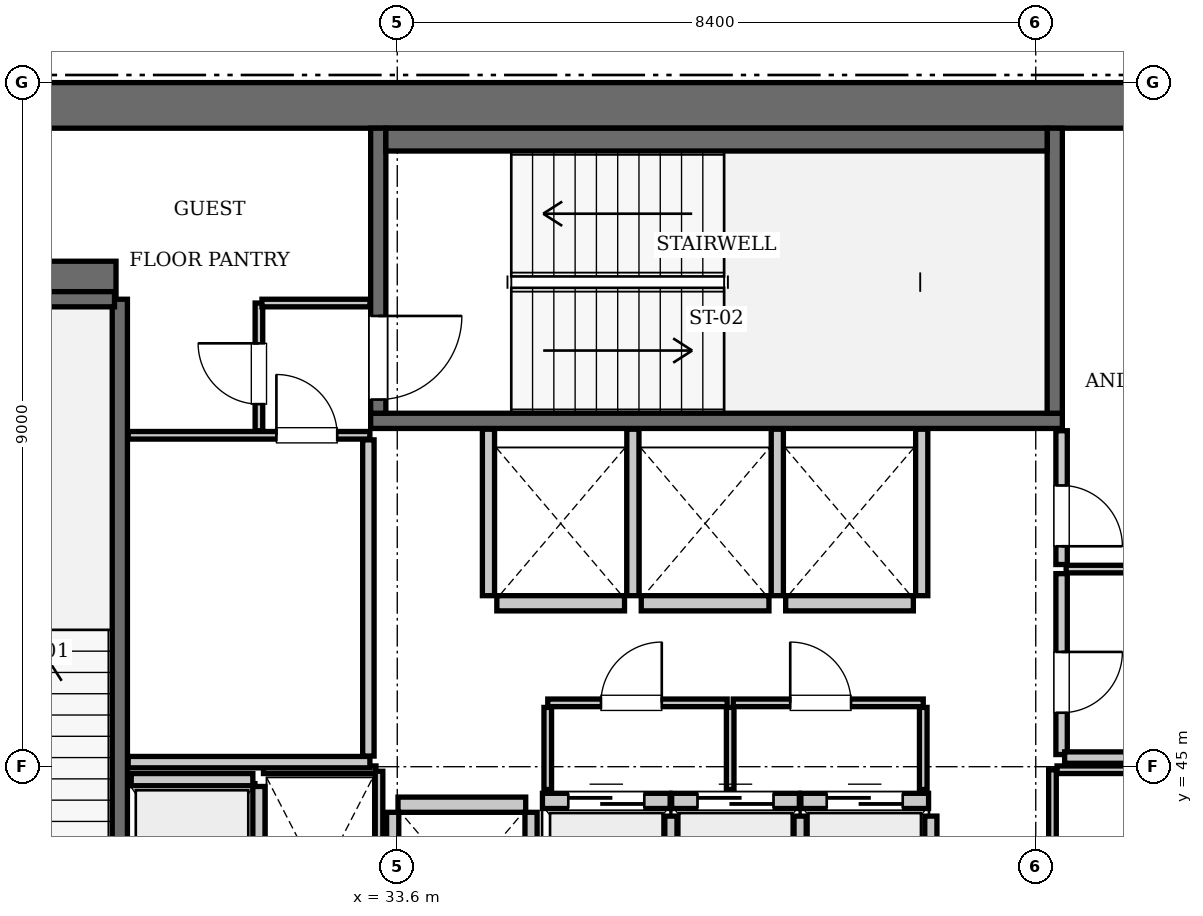
"""IFC4 building model, lengths in metres.
Left out: names, types, materials, properties, quantities, classifications, styles, units other than length and angle.
Written with IfcOpenShell. Run it as: python <this file> out.ifc"""

import sys

from ifc_helpers import new_model, si_unit, direction, frame, frame_2d, origin, place, context, subcontext, project, spatial, rectangle, extrude, element, fill, save


model = new_model("IFC4")
c1 = context("Model", 3, precision=1e-05, world=origin(), true_north=direction((0.0, 1.0)))
c2 = subcontext(c1, "Body", "Model", "MODEL_VIEW")
j1 = project(units=[si_unit("LENGTHUNIT", "METRE"), si_unit("PLANEANGLEUNIT", "RADIAN")], contexts=[c1])
p1 = place(None, origin())
s1 = spatial("IfcSite", under=j1, at=p1, CompositionType="ELEMENT")
p2 = place(p1, origin())
s2 = spatial("IfcBuilding", under=s1, at=p2, CompositionType="ELEMENT")
p3 = place(p2, frame((0.0, 0.0, 301.0)))
s3 = spatial("IfcBuildingStorey", under=s2, at=p3, CompositionType="ELEMENT", Elevation=301.0)
p4 = place(p3, frame((25.2, 53.7, 0.0), z_axis=(0.0, 0.0, 1.0), x_axis=(1.0, 0.0, 0.0)))
e1 = element("IfcWall", 1, at=p4, inside=s3, PredefinedType="SHEAR", context=c2, shape_type="SweptSolid", body=[
    extrude(rectangle(XDim=25.2, YDim=0.6, at=frame_2d((12.6, 0.0))), origin(), (0.0, 0.0, 1.0), 3.85),
])
p5 = place(p3, frame((25.8, 51.4, 0.0), z_axis=(0.0, 0.0, 1.0), x_axis=(1.0, 0.0, 0.0)))
e2 = element("IfcWall", 2, at=p5, inside=s3, PredefinedType="SHEAR", context=c2, shape_type="SweptSolid", body=[
    extrude(rectangle(XDim=4.1, YDim=0.5, at=frame_2d((2.05, 0.0))), origin(), (0.0, 0.0, 1.0), 3.85),
])
p6 = place(p3, frame((29.95, 42.0, 0.0), z_axis=(0.0, 0.0, 1.0), x_axis=(0.0, 1.0, 0.0)))
e3 = element("IfcWall", 3, at=p6, inside=s3, PredefinedType="SOLIDWALL", context=c2, shape_type="SweptSolid", body=[
    extrude(rectangle(XDim=9.15, YDim=0.2, at=frame_2d((4.575, 0.0))), origin(), (0.0, 0.0, 1.0), 3.61),
])
p7 = place(p3, frame((26.38, 51.15, 0.0), z_axis=(0.0, 0.0, 1.0), x_axis=(1.0, 0.0, 0.0)))
e4 = element("IfcWall", 4, at=p7, inside=s3, PredefinedType="SOLIDWALL", context=c2, shape_type="SweptSolid", body=[
    extrude(rectangle(XDim=3.5, YDim=0.2, at=frame_2d((1.75, 0.0))), origin(), (0.0, 0.0, 1.0), 3.61),
])
p8 = place(p3, frame((33.25, 49.55, 0.0), z_axis=(0.0, 0.0, 1.0), x_axis=(1.0, 0.0, 0.0)))
e5 = element("IfcWall", 5, at=p8, inside=s3, PredefinedType="SOLIDWALL", context=c2, shape_type="SweptSolid", body=[
    extrude(rectangle(XDim=9.1, YDim=0.2, at=frame_2d((4.55, 0.0))), origin(), (0.0, 0.0, 1.0), 3.61),
])
p9 = place(p3, frame((42.25, 49.65, 0.0), z_axis=(0.0, 0.0, 1.0), x_axis=(0.0, 1.0, 0.0)))
e6 = element("IfcWall", 6, at=p9, inside=s3, PredefinedType="SOLIDWALL", context=c2, shape_type="SweptSolid", body=[
    extrude(rectangle(XDim=3.75, YDim=0.2, at=frame_2d((1.875, 0.0))), origin(), (0.0, 0.0, 1.0), 3.61),
])
p10 = place(p3, frame((33.35, 49.65, 0.0), z_axis=(0.0, 0.0, 1.0), x_axis=(0.0, 1.0, 0.0)))
e7 = element("IfcWall", 7, at=p10, inside=s3, PredefinedType="SOLIDWALL", context=c2, shape_type="SweptSolid", body=[
    extrude(rectangle(XDim=3.75, YDim=0.2, at=frame_2d((1.875, 0.0))), origin(), (0.0, 0.0, 1.0), 3.61),
])
p11 = place(p10, frame((0.18, 0.0, 0.0)))
e8 = element("IfcOpeningElement", 8, at=p11, cuts=e7, PredefinedType="OPENING", context=c2, shape_type="SweptSolid", body=[
    extrude(rectangle(XDim=1.1, YDim=2.15, at=frame_2d((0.55, 1.075))), frame((0.0, 0.11, 0.0), z_axis=(0.0, -1.0, 0.0), x_axis=(1.0, 0.0, 0.0)), (0.0, 0.0, 1.0), 0.22),
])
p12 = place(p3, frame((33.45, 53.25, 0.0), z_axis=(0.0, 0.0, 1.0), x_axis=(1.0, 0.0, 0.0)))
e9 = element("IfcWall", 9, at=p12, inside=s3, PredefinedType="SOLIDWALL", context=c2, shape_type="SweptSolid", body=[
    extrude(rectangle(XDim=8.7, YDim=0.3, at=frame_2d((4.35, 0.0))), origin(), (0.0, 0.0, 1.0), 3.61),
])
p13 = place(p3, frame((35.51, 44.55, 0.0), z_axis=(0.0, 0.0, 1.0), x_axis=(1.0, 0.0, 0.0)))
e10 = element("IfcWall", 10, at=p13, inside=s3, PredefinedType="SOLIDWALL", context=c2, shape_type="SweptSolid", body=[
    extrude(rectangle(XDim=1.68, YDim=0.2, at=frame_2d((0.84, 0.0))), origin(), (0.0, 0.0, 1.0), 3.61),
])
p14 = place(p13, frame((0.34, 0.0, 0.0)))
e11 = element("IfcOpeningElement", 11, at=p14, cuts=e10, PredefinedType="OPENING", context=c2, shape_type="SweptSolid", body=[
    extrude(rectangle(XDim=1.0, YDim=2.15, at=frame_2d((0.5, 1.075))), frame((0.0, 0.11, 0.0), z_axis=(0.0, -1.0, 0.0), x_axis=(1.0, 0.0, 0.0)), (0.0, 0.0, 1.0), 0.22),
])
p15 = place(p3, frame((37.21, 44.55, 0.0), z_axis=(0.0, 0.0, 1.0), x_axis=(1.0, 0.0, 0.0)))
e12 = element("IfcWall", 12, at=p15, inside=s3, PredefinedType="SOLIDWALL", context=c2, shape_type="SweptSolid", body=[
    extrude(rectangle(XDim=1.68, YDim=0.2, at=frame_2d((0.84, 0.0))), origin(), (0.0, 0.0, 1.0), 3.61),
])
p16 = place(p15, frame((0.34, 0.0, 0.0)))
e13 = element("IfcOpeningElement", 13, at=p16, cuts=e12, PredefinedType="OPENING", context=c2, shape_type="SweptSolid", body=[
    extrude(rectangle(XDim=1.0, YDim=2.15, at=frame_2d((0.5, 1.075))), frame((0.0, 0.11, 0.0), z_axis=(0.0, -1.0, 0.0), x_axis=(1.0, 0.0, 0.0)), (0.0, 0.0, 1.0), 0.22),
])
p17 = place(p3, frame((38.91, 44.55, 0.0), z_axis=(0.0, 0.0, 1.0), x_axis=(1.0, 0.0, 0.0)))
e14 = element("IfcWall", 14, at=p17, inside=s3, PredefinedType="SOLIDWALL", context=c2, shape_type="SweptSolid", body=[
    extrude(rectangle(XDim=1.68, YDim=0.2, at=frame_2d((0.84, 0.0))), origin(), (0.0, 0.0, 1.0), 3.61),
])
p18 = place(p17, frame((0.34, 0.0, 0.0)))
e15 = element("IfcOpeningElement", 15, at=p18, cuts=e14, PredefinedType="OPENING", context=c2, shape_type="SweptSolid", body=[
    extrude(rectangle(XDim=1.0, YDim=2.15, at=frame_2d((0.5, 1.075))), frame((0.0, 0.11, 0.0), z_axis=(0.0, -1.0, 0.0), x_axis=(1.0, 0.0, 0.0)), (0.0, 0.0, 1.0), 0.22),
])
p19 = place(p3, frame((34.91, 47.15, 0.0), z_axis=(0.0, 0.0, 1.0), x_axis=(1.0, 0.0, 0.0)))
e16 = element("IfcWall", 16, at=p19, inside=s3, PredefinedType="SOLIDWALL", context=c2, shape_type="SweptSolid", body=[
    extrude(rectangle(XDim=1.68, YDim=0.2, at=frame_2d((0.84, 0.0))), origin(), (0.0, 0.0, 1.0), 3.61),
])
for number, where, z_axis, x_axis in (
    (17, (36.81, 47.15, 0.0), (0.0, 0.0, 1.0), (1.0, 0.0, 0.0)),
    (18, (38.71, 47.15, 0.0), (0.0, 0.0, 1.0), (1.0, 0.0, 0.0)),
    (19, (33.61, 44.5, 0.0), (0.0, 0.0, 1.0), (1.0, 0.0, 0.0)),
):
    element("IfcWall", number, at=place(p3, frame(where, z_axis=z_axis, x_axis=x_axis)), inside=s3, PredefinedType="SOLIDWALL", context=c2, shape_type="SweptSolid", body=[
        extrude(rectangle(XDim=1.68, YDim=0.2, at=frame_2d((0.84, 0.0))), origin(), (0.0, 0.0, 1.0), 3.61),
    ])
p20 = place(p3, frame((30.1, 44.83, 0.0), z_axis=(0.0, 0.0, 1.0), x_axis=(1.0, 0.0, 0.0)))
e20 = element("IfcWall", 20, at=p20, inside=s3, PredefinedType="SOLIDWALL", context=c2, shape_type="SweptSolid", body=[
    extrude(rectangle(XDim=1.6, YDim=0.16, at=frame_2d((0.8, 0.0))), origin(), (0.0, 0.0, 1.0), 3.61),
])
p21 = place(p3, frame((31.78, 42.0, 0.0), z_axis=(0.0, 0.0, 1.0), x_axis=(0.0, 1.0, 0.0)))
e21 = element("IfcWall", 21, at=p21, inside=s3, PredefinedType="SOLIDWALL", context=c2, shape_type="SweptSolid", body=[
    extrude(rectangle(XDim=2.74, YDim=0.16, at=frame_2d((1.37, 0.0))), origin(), (0.0, 0.0, 1.0), 3.61),
])
for number, where, z_axis, x_axis in (
    (22, (37.2, 42.0, 0.0), (0.0, 0.0, 1.0), (0.0, 1.0, 0.0)),
    (23, (38.9, 42.0, 0.0), (0.0, 0.0, 1.0), (0.0, 1.0, 0.0)),
    (24, (40.62, 42.0, 0.0), (0.0, 0.0, 1.0), (0.0, 1.0, 0.0)),
):
    element("IfcWall", number, at=place(p3, frame(where, z_axis=z_axis, x_axis=x_axis)), inside=s3, PredefinedType="SOLIDWALL", context=c2, shape_type="SweptSolid", body=[
        extrude(rectangle(XDim=2.35, YDim=0.16, at=frame_2d((1.175, 0.0))), origin(), (0.0, 0.0, 1.0), 3.61),
    ])
for number, where, z_axis, x_axis in (
    (25, (34.8, 47.25, 0.0), (0.0, 0.0, 1.0), (0.0, 1.0, 0.0)),
    (26, (36.7, 47.25, 0.0), (0.0, 0.0, 1.0), (0.0, 1.0, 0.0)),
    (27, (38.6, 47.25, 0.0), (0.0, 0.0, 1.0), (0.0, 1.0, 0.0)),
    (28, (40.5, 47.25, 0.0), (0.0, 0.0, 1.0), (0.0, 1.0, 0.0)),
):
    element("IfcWall", number, at=place(p3, frame(where, z_axis=z_axis, x_axis=x_axis)), inside=s3, PredefinedType="SOLIDWALL", context=c2, shape_type="SweptSolid", body=[
        extrude(rectangle(XDim=2.19, YDim=0.16, at=frame_2d((1.095, 0.0))), origin(), (0.0, 0.0, 1.0), 3.61),
    ])
for number, where, z_axis, x_axis in (
    (29, (33.54, 42.0, 0.0), (0.0, 0.0, 1.0), (0.0, 1.0, 0.0)),
    (30, (35.36, 42.0, 0.0), (0.0, 0.0, 1.0), (0.0, 1.0, 0.0)),
):
    element("IfcWall", number, at=place(p3, frame(where, z_axis=z_axis, x_axis=x_axis)), inside=s3, PredefinedType="SOLIDWALL", context=c2, shape_type="SweptSolid", body=[
        extrude(rectangle(XDim=2.4, YDim=0.16, at=frame_2d((1.2, 0.0))), origin(), (0.0, 0.0, 1.0), 3.61),
    ])
p22 = place(p3, frame((31.84, 44.96, 0.0), z_axis=(0.0, 0.0, 1.0), x_axis=(1.0, 0.0, 0.0)))
e31 = element("IfcWall", 31, at=p22, inside=s3, PredefinedType="PARTITIONING", context=c2, shape_type="SweptSolid", body=[
    extrude(rectangle(XDim=1.48, YDim=0.1, at=frame_2d((0.74, 0.0))), origin(), (0.0, 0.0, 1.0), 3.61),
])
p23 = place(p3, frame((33.36, 42.06, 0.0), z_axis=(0.0, 0.0, 1.0), x_axis=(0.0, 1.0, 0.0)))
e32 = element("IfcWall", 32, at=p23, inside=s3, PredefinedType="PARTITIONING", context=c2, shape_type="SweptSolid", body=[
    extrude(rectangle(XDim=2.88, YDim=0.1, at=frame_2d((1.44, 0.0))), origin(), (0.0, 0.0, 1.0), 3.61),
])
p24 = place(p3, frame((35.58, 45.84, 0.0), z_axis=(0.0, 0.0, 1.0), x_axis=(1.0, 0.0, 0.0)))
e33 = element("IfcWall", 33, at=p24, inside=s3, PredefinedType="PARTITIONING", context=c2, shape_type="SweptSolid", body=[
    extrude(rectangle(XDim=2.36, YDim=0.1, at=frame_2d((1.18, 0.0))), origin(), (0.0, 0.0, 1.0), 3.61),
])
p25 = place(p24, frame((0.7, 0.0, 0.0)))
e34 = element("IfcOpeningElement", 34, at=p25, cuts=e33, PredefinedType="OPENING", context=c2, shape_type="SweptSolid", body=[
    extrude(rectangle(XDim=0.8, YDim=2.05, at=frame_2d((0.4, 1.025))), frame((0.0, 0.06, 0.0), z_axis=(0.0, -1.0, 0.0), x_axis=(1.0, 0.0, 0.0)), (0.0, 0.0, 1.0), 0.12),
])
p26 = place(p3, frame((38.02, 45.84, 0.0), z_axis=(0.0, 0.0, 1.0), x_axis=(1.0, 0.0, 0.0)))
e35 = element("IfcWall", 35, at=p26, inside=s3, PredefinedType="PARTITIONING", context=c2, shape_type="SweptSolid", body=[
    extrude(rectangle(XDim=2.5, YDim=0.1, at=frame_2d((1.25, 0.0))), origin(), (0.0, 0.0, 1.0), 3.61),
])
p27 = place(p26, frame((0.75, 0.0, 0.0)))
e36 = element("IfcOpeningElement", 36, at=p27, cuts=e35, PredefinedType="OPENING", context=c2, shape_type="SweptSolid", body=[
    extrude(rectangle(XDim=0.8, YDim=2.05, at=frame_2d((0.4, 1.025))), frame((0.0, 0.06, 0.0), z_axis=(0.0, -1.0, 0.0), x_axis=(1.0, 0.0, 0.0)), (0.0, 0.0, 1.0), 0.12),
])
for number, where, z_axis, x_axis in (
    (37, (35.58, 44.7, 0.0), (0.0, 0.0, 1.0), (0.0, 1.0, 0.0)),
    (38, (37.98, 44.7, 0.0), (0.0, 0.0, 1.0), (0.0, 1.0, 0.0)),
    (39, (40.52, 44.7, 0.0), (0.0, 0.0, 1.0), (0.0, 1.0, 0.0)),
):
    element("IfcWall", number, at=place(p3, frame(where, z_axis=z_axis, x_axis=x_axis)), inside=s3, PredefinedType="PARTITIONING", context=c2, shape_type="SweptSolid", body=[
        extrude(rectangle(XDim=1.08, YDim=0.1, at=frame_2d((0.54, 0.0))), origin(), (0.0, 0.0, 1.0), 3.61),
    ])
p28 = place(p3, frame((42.22, 42.05, 0.0), z_axis=(0.0, 0.0, 1.0), x_axis=(0.0, 1.0, 0.0)))
e40 = element("IfcWall", 40, at=p28, inside=s3, PredefinedType="PARTITIONING", context=c2, shape_type="SweptSolid", body=[
    extrude(rectangle(XDim=2.91, YDim=0.1, at=frame_2d((1.455, 0.0))), origin(), (0.0, 0.0, 1.0), 3.61),
])
p29 = place(p28, frame((0.65, 0.0, 0.0)))
e41 = element("IfcOpeningElement", 41, at=p29, cuts=e40, PredefinedType="OPENING", context=c2, shape_type="SweptSolid", body=[
    extrude(rectangle(XDim=0.8, YDim=2.05, at=frame_2d((0.4, 1.025))), frame((0.0, 0.06, 0.0), z_axis=(0.0, -1.0, 0.0), x_axis=(1.0, 0.0, 0.0)), (0.0, 0.0, 1.0), 0.12),
])
p30 = place(p3, frame((42.28, 44.96, 0.0), z_axis=(0.0, 0.0, 1.0), x_axis=(1.0, 0.0, 0.0)))
e42 = element("IfcWall", 42, at=p30, inside=s3, PredefinedType="PARTITIONING", context=c2, shape_type="SweptSolid", body=[
    extrude(rectangle(XDim=1.3, YDim=0.1, at=frame_2d((0.65, 0.0))), origin(), (0.0, 0.0, 1.0), 3.61),
])
p31 = place(p3, frame((30.06, 45.06, 0.0), z_axis=(0.0, 0.0, 1.0), x_axis=(1.0, 0.0, 0.0)))
e43 = element("IfcWall", 43, at=p31, inside=s3, PredefinedType="PARTITIONING", context=c2, shape_type="SweptSolid", body=[
    extrude(rectangle(XDim=3.18, YDim=0.15, at=frame_2d((1.59, 0.0))), origin(), (0.0, 0.0, 1.0), 3.61),
])
p32 = place(p3, frame((33.22, 45.14, 0.0), z_axis=(0.0, 0.0, 1.0), x_axis=(0.0, 1.0, 0.0)))
e44 = element("IfcWall", 44, at=p32, inside=s3, PredefinedType="PARTITIONING", context=c2, shape_type="SweptSolid", body=[
    extrude(rectangle(XDim=4.16, YDim=0.15, at=frame_2d((2.08, 0.0))), origin(), (0.0, 0.0, 1.0), 3.61),
])
p33 = place(p3, frame((30.06, 49.36, 0.0), z_axis=(0.0, 0.0, 1.0), x_axis=(1.0, 0.0, 0.0)))
e45 = element("IfcWall", 45, at=p33, inside=s3, PredefinedType="PARTITIONING", context=c2, shape_type="SweptSolid", body=[
    extrude(rectangle(XDim=3.18, YDim=0.1, at=frame_2d((1.59, 0.0))), origin(), (0.0, 0.0, 1.0), 3.61),
])
p34 = place(p33, frame((1.95, 0.0, 0.0)))
e46 = element("IfcOpeningElement", 46, at=p34, cuts=e45, PredefinedType="OPENING", context=c2, shape_type="SweptSolid", body=[
    extrude(rectangle(XDim=0.8, YDim=2.05, at=frame_2d((0.4, 1.025))), frame((0.0, 0.06, 0.0), z_axis=(0.0, -1.0, 0.0), x_axis=(1.0, 0.0, 0.0)), (0.0, 0.0, 1.0), 0.12),
])
p35 = place(p3, frame((31.78, 49.42, 0.0), z_axis=(0.0, 0.0, 1.0), x_axis=(0.0, 1.0, 0.0)))
e47 = element("IfcWall", 47, at=p35, inside=s3, PredefinedType="PARTITIONING", context=c2, shape_type="SweptSolid", body=[
    extrude(rectangle(XDim=1.68, YDim=0.1, at=frame_2d((0.84, 0.0))), origin(), (0.0, 0.0, 1.0), 3.61),
])
p36 = place(p35, frame((0.35, 0.0, 0.0)))
e48 = element("IfcOpeningElement", 48, at=p36, cuts=e47, PredefinedType="OPENING", context=c2, shape_type="SweptSolid", body=[
    extrude(rectangle(XDim=0.8, YDim=2.05, at=frame_2d((0.4, 1.025))), frame((0.0, 0.06, 0.0), z_axis=(0.0, -1.0, 0.0), x_axis=(1.0, 0.0, 0.0)), (0.0, 0.0, 1.0), 0.12),
])
p37 = place(p3, frame((31.82, 51.1, 0.0), z_axis=(0.0, 0.0, 1.0), x_axis=(1.0, 0.0, 0.0)))
e49 = element("IfcWall", 49, at=p37, inside=s3, PredefinedType="PARTITIONING", context=c2, shape_type="SweptSolid", body=[
    extrude(rectangle(XDim=1.42, YDim=0.1, at=frame_2d((0.71, 0.0))), origin(), (0.0, 0.0, 1.0), 3.61),
])
p38 = place(p3, frame((42.34, 45.16, 0.0), z_axis=(0.0, 0.0, 1.0), x_axis=(0.0, 1.0, 0.0)))
e50 = element("IfcWall", 50, at=p38, inside=s3, PredefinedType="PARTITIONING", context=c2, shape_type="SweptSolid", body=[
    extrude(rectangle(XDim=2.38, YDim=0.15, at=frame_2d((1.19, 0.0))), origin(), (0.0, 0.0, 1.0), 3.61),
])
p39 = place(p38, frame((0.55, 0.0, 0.0)))
e51 = element("IfcOpeningElement", 51, at=p39, cuts=e50, PredefinedType="OPENING", context=c2, shape_type="SweptSolid", body=[
    extrude(rectangle(XDim=0.8, YDim=2.05, at=frame_2d((0.4, 1.025))), frame((0.0, 0.085, 0.0), z_axis=(0.0, -1.0, 0.0), x_axis=(1.0, 0.0, 0.0)), (0.0, 0.0, 1.0), 0.17),
])
p40 = place(p3, frame((42.34, 47.66, 0.0), z_axis=(0.0, 0.0, 1.0), x_axis=(0.0, 1.0, 0.0)))
e52 = element("IfcWall", 52, at=p40, inside=s3, PredefinedType="PARTITIONING", context=c2, shape_type="SweptSolid", body=[
    extrude(rectangle(XDim=1.76, YDim=0.15, at=frame_2d((0.88, 0.0))), origin(), (0.0, 0.0, 1.0), 3.61),
])
p41 = place(p40, frame((0.24, 0.0, 0.0)))
e53 = element("IfcOpeningElement", 53, at=p41, cuts=e52, PredefinedType="OPENING", context=c2, shape_type="SweptSolid", body=[
    extrude(rectangle(XDim=0.8, YDim=2.05, at=frame_2d((0.4, 1.025))), frame((0.0, 0.085, 0.0), z_axis=(0.0, -1.0, 0.0), x_axis=(1.0, 0.0, 0.0)), (0.0, 0.0, 1.0), 0.17),
])
p42 = place(p3, frame((42.4, 47.6, 0.0), z_axis=(0.0, 0.0, 1.0), x_axis=(1.0, 0.0, 0.0)))
e54 = element("IfcWall", 54, at=p42, inside=s3, PredefinedType="PARTITIONING", context=c2, shape_type="SweptSolid", body=[
    extrude(rectangle(XDim=3.1, YDim=0.1, at=frame_2d((1.55, 0.0))), origin(), (0.0, 0.0, 1.0), 3.61),
])
p43 = place(p3, frame((42.38, 45.12, 0.0), z_axis=(0.0, 0.0, 1.0), x_axis=(1.0, 0.0, 0.0)))
e55 = element("IfcWall", 55, at=p43, inside=s3, PredefinedType="PARTITIONING", context=c2, shape_type="SweptSolid", body=[
    extrude(rectangle(XDim=3.14, YDim=0.15, at=frame_2d((1.57, 0.0))), origin(), (0.0, 0.0, 1.0), 3.61),
])
p44 = place(p11, frame((1.1, 0.0, 0.0), z_axis=(0.0, 0.0, 1.0), x_axis=(-1.0, 0.0, 0.0)))
e56 = element("IfcDoor", 56, at=p44, inside=s3, OperationType="SINGLE_SWING_LEFT", PredefinedType="DOOR", context=c2, shape_type="SweptSolid", body=[
    extrude(rectangle(XDim=1.1, YDim=2.15, at=frame_2d((0.55, 1.075))), frame((0.0, 0.025, 0.0), z_axis=(0.0, -1.0, 0.0), x_axis=(1.0, 0.0, 0.0)), (0.0, 0.0, 1.0), 0.05),
])
fill(e8, e56)
p45 = place(p14, origin())
e57 = element("IfcDoor", 57, at=p45, inside=s3, OperationType="SLIDING_TO_LEFT", PredefinedType="DOOR", context=c2, shape_type="SweptSolid", body=[
    extrude(rectangle(XDim=1.0, YDim=2.15, at=frame_2d((0.5, 1.075))), frame((0.0, 0.025, 0.0), z_axis=(0.0, -1.0, 0.0), x_axis=(1.0, 0.0, 0.0)), (0.0, 0.0, 1.0), 0.05),
])
fill(e11, e57)
p46 = place(p16, origin())
e58 = element("IfcDoor", 58, at=p46, inside=s3, OperationType="SLIDING_TO_LEFT", PredefinedType="DOOR", context=c2, shape_type="SweptSolid", body=[
    extrude(rectangle(XDim=1.0, YDim=2.15, at=frame_2d((0.5, 1.075))), frame((0.0, 0.025, 0.0), z_axis=(0.0, -1.0, 0.0), x_axis=(1.0, 0.0, 0.0)), (0.0, 0.0, 1.0), 0.05),
])
fill(e13, e58)
p47 = place(p18, origin())
e59 = element("IfcDoor", 59, at=p47, inside=s3, OperationType="SLIDING_TO_LEFT", PredefinedType="DOOR", context=c2, shape_type="SweptSolid", body=[
    extrude(rectangle(XDim=1.0, YDim=2.15, at=frame_2d((0.5, 1.075))), frame((0.0, 0.025, 0.0), z_axis=(0.0, -1.0, 0.0), x_axis=(1.0, 0.0, 0.0)), (0.0, 0.0, 1.0), 0.05),
])
fill(e15, e59)
p48 = place(p25, origin())
e60 = element("IfcDoor", 60, at=p48, inside=s3, OperationType="SINGLE_SWING_RIGHT", PredefinedType="DOOR", context=c2, shape_type="SweptSolid", body=[
    extrude(rectangle(XDim=0.8, YDim=2.05, at=frame_2d((0.4, 1.025))), frame((0.0, 0.025, 0.0), z_axis=(0.0, -1.0, 0.0), x_axis=(1.0, 0.0, 0.0)), (0.0, 0.0, 1.0), 0.05),
])
fill(e34, e60)
p49 = place(p27, origin())
e61 = element("IfcDoor", 61, at=p49, inside=s3, OperationType="SINGLE_SWING_LEFT", PredefinedType="DOOR", context=c2, shape_type="SweptSolid", body=[
    extrude(rectangle(XDim=0.8, YDim=2.05, at=frame_2d((0.4, 1.025))), frame((0.0, 0.025, 0.0), z_axis=(0.0, -1.0, 0.0), x_axis=(1.0, 0.0, 0.0)), (0.0, 0.0, 1.0), 0.05),
])
fill(e36, e61)
p50 = place(p34, origin())
e62 = element("IfcDoor", 62, at=p50, inside=s3, OperationType="SINGLE_SWING_LEFT", PredefinedType="DOOR", context=c2, shape_type="SweptSolid", body=[
    extrude(rectangle(XDim=0.8, YDim=2.05, at=frame_2d((0.4, 1.025))), frame((0.0, 0.025, 0.0), z_axis=(0.0, -1.0, 0.0), x_axis=(1.0, 0.0, 0.0)), (0.0, 0.0, 1.0), 0.05),
])
fill(e46, e62)
p51 = place(p36, origin())
e63 = element("IfcDoor", 63, at=p51, inside=s3, OperationType="SINGLE_SWING_RIGHT", PredefinedType="DOOR", context=c2, shape_type="SweptSolid", body=[
    extrude(rectangle(XDim=0.8, YDim=2.05, at=frame_2d((0.4, 1.025))), frame((0.0, 0.025, 0.0), z_axis=(0.0, -1.0, 0.0), x_axis=(1.0, 0.0, 0.0)), (0.0, 0.0, 1.0), 0.05),
])
fill(e48, e63)
p52 = place(p39, frame((0.8, 0.0, 0.0), z_axis=(0.0, 0.0, 1.0), x_axis=(-1.0, 0.0, 0.0)))
e64 = element("IfcDoor", 64, at=p52, inside=s3, OperationType="SINGLE_SWING_LEFT", PredefinedType="DOOR", context=c2, shape_type="SweptSolid", body=[
    extrude(rectangle(XDim=0.8, YDim=2.05, at=frame_2d((0.4, 1.025))), frame((0.0, 0.025, 0.0), z_axis=(0.0, -1.0, 0.0), x_axis=(1.0, 0.0, 0.0)), (0.0, 0.0, 1.0), 0.05),
])
fill(e51, e64)
p53 = place(p41, frame((0.8, 0.0, 0.0), z_axis=(0.0, 0.0, 1.0), x_axis=(-1.0, 0.0, 0.0)))
e65 = element("IfcDoor", 65, at=p53, inside=s3, OperationType="SINGLE_SWING_RIGHT", PredefinedType="DOOR", context=c2, shape_type="SweptSolid", body=[
    extrude(rectangle(XDim=0.8, YDim=2.05, at=frame_2d((0.4, 1.025))), frame((0.0, 0.025, 0.0), z_axis=(0.0, -1.0, 0.0), x_axis=(1.0, 0.0, 0.0)), (0.0, 0.0, 1.0), 0.05),
])
fill(e53, e65)
save(model, sys.argv[1])
